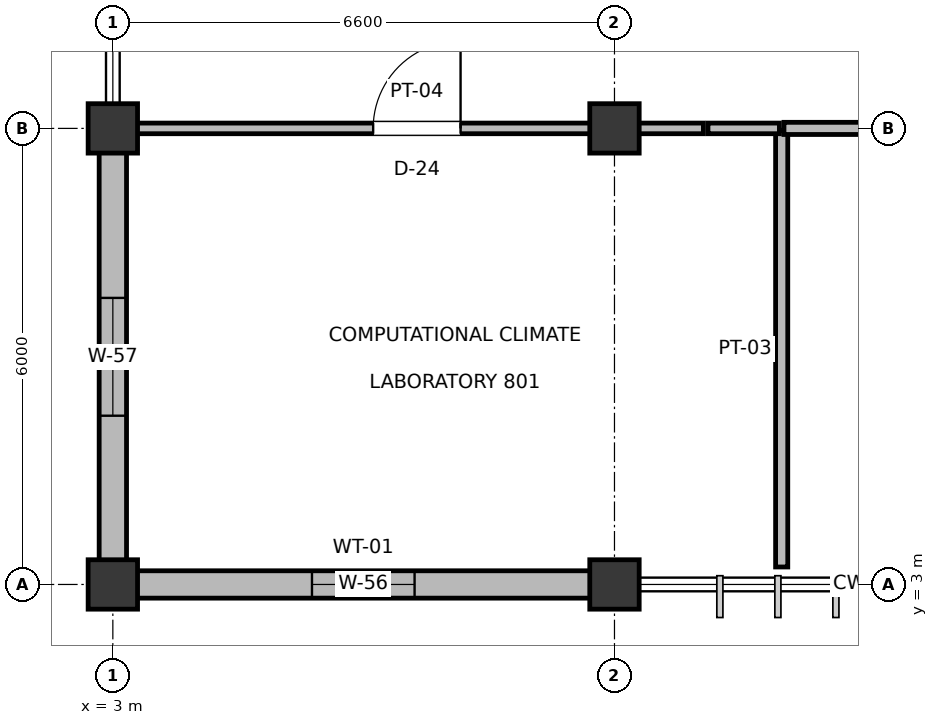
"""IFC4 building model, lengths in metres.
Left out: names, types, materials, properties, quantities, classifications, styles, units other than length and angle.
Written with IfcOpenShell. Run it as: python <this file> out.ifc"""

import sys

from ifc_helpers import new_model, si_unit, direction, frame, frame_2d, origin, origin_2d, place, context, subcontext, project, spatial, rectangle, extrude, element, fill, save


model = new_model("IFC4")
c1 = context("Model", 3, precision=1e-05, world=origin(), true_north=direction((0.0, 1.0)))
c2 = subcontext(c1, "Body", "Model", "MODEL_VIEW")
j1 = project(units=[si_unit("LENGTHUNIT", "METRE"), si_unit("PLANEANGLEUNIT", "RADIAN")], contexts=[c1])
p1 = place(None, origin())
s1 = spatial("IfcSite", under=j1, at=p1, CompositionType="ELEMENT")
p2 = place(p1, origin())
s2 = spatial("IfcBuilding", under=s1, at=p2, CompositionType="ELEMENT")
p3 = place(p2, frame((0.0, 0.0, 36.8)))
s3 = spatial("IfcBuildingStorey", under=s2, at=p3, CompositionType="ELEMENT", Elevation=36.8)
for number, where, z_axis, x_axis in (
    (1, (3.0, 3.0, 0.0), (0.0, 0.0, 1.0), (1.0, 0.0, 0.0)),
    (2, (3.0, 9.0, 0.0), (0.0, 0.0, 1.0), (1.0, 0.0, 0.0)),
    (3, (9.6, 3.0, 0.0), (0.0, 0.0, 1.0), (1.0, 0.0, 0.0)),
    (4, (9.6, 9.0, 0.0), (0.0, 0.0, 1.0), (1.0, 0.0, 0.0)),
):
    element("IfcColumn", number, at=place(p3, frame(where, z_axis=z_axis, x_axis=x_axis)), inside=s3, PredefinedType="COLUMN", context=c2, shape_type="SweptSolid", body=[
        extrude(rectangle(XDim=0.65, YDim=0.65, at=origin_2d()), origin(), (0.0, 0.0, 1.0), 3.8),
    ])
p4 = place(p3, frame((3.305, 3.0, 0.0), z_axis=(0.0, 0.0, 1.0), x_axis=(1.0, 0.0, 0.0)))
e5 = element("IfcWall", 5, at=p4, inside=s3, PredefinedType="SOLIDWALL", context=c2, shape_type="SweptSolid", body=[
    extrude(rectangle(XDim=5.98, YDim=0.36, at=frame_2d((2.99, 0.0))), origin(), (0.0, 0.0, 1.0), 2.875),
])
p5 = place(p4, frame((2.315, 0.0, 0.9)))
e6 = element("IfcOpeningElement", 6, at=p5, cuts=e5, PredefinedType="OPENING", context=c2, shape_type="SweptSolid", body=[
    extrude(rectangle(XDim=1.35, YDim=1.75, at=frame_2d((0.675, 0.875))), frame((0.0, 0.19, 0.0), z_axis=(0.0, -1.0, 0.0), x_axis=(1.0, 0.0, 0.0)), (0.0, 0.0, 1.0), 0.38),
])
p6 = place(p3, frame((3.0, 3.305, 0.0), z_axis=(0.0, 0.0, 1.0), x_axis=(0.0, 1.0, 0.0)))
e7 = element("IfcWall", 7, at=p6, inside=s3, PredefinedType="SOLIDWALL", context=c2, shape_type="SweptSolid", body=[
    extrude(rectangle(XDim=5.38, YDim=0.36, at=frame_2d((2.69, 0.0))), origin(), (0.0, 0.0, 1.0), 2.875),
])
p7 = place(p6, frame((1.915, 0.0, 0.9)))
e8 = element("IfcOpeningElement", 8, at=p7, cuts=e7, PredefinedType="OPENING", context=c2, shape_type="SweptSolid", body=[
    extrude(rectangle(XDim=1.55, YDim=1.15, at=frame_2d((0.775, 0.575))), frame((0.0, 0.19, 0.0), z_axis=(0.0, -1.0, 0.0), x_axis=(1.0, 0.0, 0.0)), (0.0, 0.0, 1.0), 0.38),
])
p8 = place(p3, frame((11.8, 3.23, 0.0), z_axis=(0.0, 0.0, 1.0), x_axis=(0.0, 1.0, 0.0)))
e9 = element("IfcWall", 9, at=p8, inside=s3, PredefinedType="PARTITIONING", context=c2, shape_type="SweptSolid", body=[
    extrude(rectangle(XDim=5.74, YDim=0.16, at=frame_2d((2.87, 0.0))), origin(), (0.0, 0.0, 1.0), 2.825),
])
p9 = place(p3, frame((3.23, 9.0, 0.0), z_axis=(0.0, 0.0, 1.0), x_axis=(1.0, 0.0, 0.0)))
e10 = element("IfcWall", 10, at=p9, inside=s3, PredefinedType="PARTITIONING", context=c2, shape_type="SweptSolid", body=[
    extrude(rectangle(XDim=7.54, YDim=0.14, at=frame_2d((3.77, 0.0))), origin(), (0.0, 0.0, 1.0), 2.655),
])
p10 = place(p9, frame((3.195, 0.0, 0.0)))
e11 = element("IfcOpeningElement", 11, at=p10, cuts=e10, PredefinedType="OPENING", context=c2, shape_type="SweptSolid", body=[
    extrude(rectangle(XDim=1.15, YDim=2.15, at=frame_2d((0.575, 1.075))), frame((0.0, 0.08, 0.0), z_axis=(0.0, -1.0, 0.0), x_axis=(1.0, 0.0, 0.0)), (0.0, 0.0, 1.0), 0.16),
])
p11 = place(p3, frame((10.83, 9.0, 0.0), z_axis=(0.0, 0.0, 1.0), x_axis=(1.0, 0.0, 0.0)))
e12 = element("IfcWall", 12, at=p11, inside=s3, PredefinedType="PARTITIONING", context=c2, shape_type="SweptSolid", body=[
    extrude(rectangle(XDim=0.94, YDim=0.14, at=frame_2d((0.47, 0.0))), origin(), (0.0, 0.0, 1.0), 2.825),
])
p12 = place(p3, frame((11.83, 9.0, 0.0), z_axis=(0.0, 0.0, 1.0), x_axis=(1.0, 0.0, 0.0)))
e13 = element("IfcWall", 13, at=p12, inside=s3, PredefinedType="PARTITIONING", context=c2, shape_type="SweptSolid", body=[
    extrude(rectangle(XDim=8.34, YDim=0.16, at=frame_2d((4.17, 0.0))), origin(), (0.0, 0.0, 1.0), 2.615),
])
p13 = place(p12, frame((2.68, 0.0, 0.0)))
e14 = element("IfcOpeningElement", 14, at=p13, cuts=e13, PredefinedType="OPENING", context=c2, shape_type="SweptSolid", body=[
    extrude(rectangle(XDim=1.18, YDim=2.2, at=frame_2d((0.59, 1.1))), frame((0.0, 0.09, 0.0), z_axis=(0.0, -1.0, 0.0), x_axis=(1.0, 0.0, 0.0)), (0.0, 0.0, 1.0), 0.18),
])
p14 = place(p5, frame((1.35, 0.0, 0.0), z_axis=(0.0, 0.0, 1.0), x_axis=(-1.0, 0.0, 0.0)))
e15 = element("IfcWindow", 15, at=p14, inside=s3, PartitioningType="DOUBLE_PANEL_VERTICAL", PredefinedType="WINDOW", context=c2, shape_type="SweptSolid", body=[
    extrude(rectangle(XDim=1.35, YDim=1.75, at=frame_2d((0.675, 0.875))), frame((0.0, 0.03, 0.0), z_axis=(0.0, -1.0, 0.0), x_axis=(1.0, 0.0, 0.0)), (0.0, 0.0, 1.0), 0.06),
])
fill(e6, e15)
p15 = place(p7, origin())
e16 = element("IfcWindow", 16, at=p15, inside=s3, PartitioningType="DOUBLE_PANEL_VERTICAL", PredefinedType="WINDOW", context=c2, shape_type="SweptSolid", body=[
    extrude(rectangle(XDim=1.55, YDim=1.15, at=frame_2d((0.775, 0.575))), frame((0.0, 0.03, 0.0), z_axis=(0.0, -1.0, 0.0), x_axis=(1.0, 0.0, 0.0)), (0.0, 0.0, 1.0), 0.06),
])
fill(e8, e16)
p16 = place(p10, origin())
e17 = element("IfcDoor", 17, at=p16, inside=s3, OperationType="SINGLE_SWING_RIGHT", PredefinedType="DOOR", context=c2, shape_type="SweptSolid", body=[
    extrude(rectangle(XDim=1.15, YDim=2.15, at=frame_2d((0.575, 1.075))), frame((0.0, 0.025, 0.0), z_axis=(0.0, -1.0, 0.0), x_axis=(1.0, 0.0, 0.0)), (0.0, 0.0, 1.0), 0.05),
])
fill(e11, e17)
save(model, sys.argv[1])
